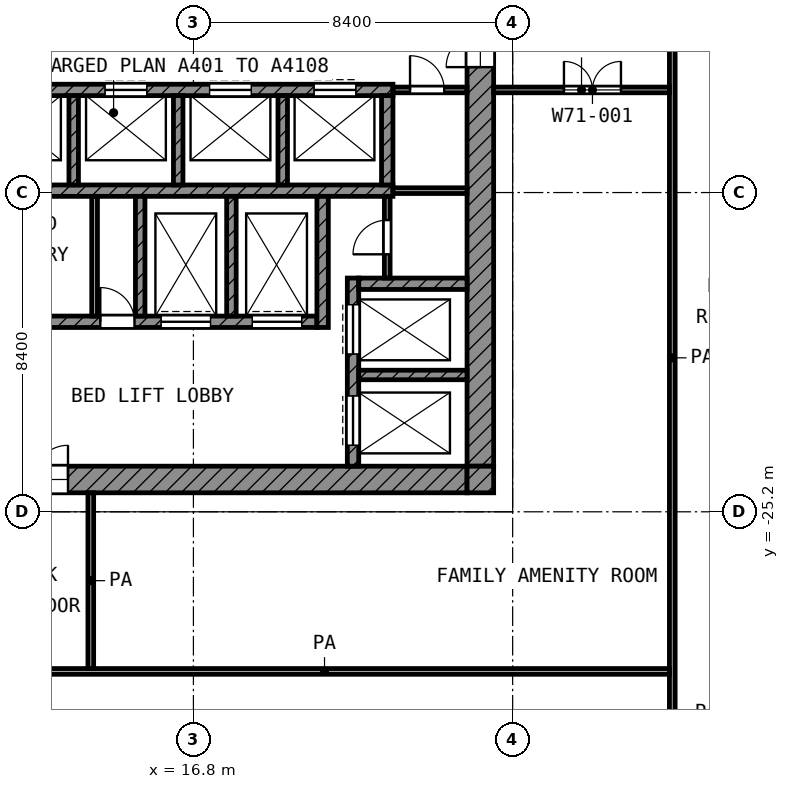
"""IFC4 building model, lengths in metres.
Left out: names, types, materials, properties, quantities, classifications, styles, units other than length and angle.
Written with IfcOpenShell. Run it as: python <this file> out.ifc"""

import sys

from ifc_helpers import new_model, si_unit, direction, frame, frame_2d, origin, place, context, subcontext, project, spatial, rectangle, extrude, element, fill, save


model = new_model("IFC4")
c1 = context("Model", 3, precision=1e-05, world=origin(), true_north=direction((0.0, 1.0)))
c2 = subcontext(c1, "Body", "Model", "MODEL_VIEW")
j1 = project(units=[si_unit("LENGTHUNIT", "METRE"), si_unit("PLANEANGLEUNIT", "RADIAN")], contexts=[c1])
p1 = place(None, origin())
s1 = spatial("IfcSite", under=j1, at=p1, CompositionType="ELEMENT")
p2 = place(p1, origin())
s2 = spatial("IfcBuilding", under=s1, at=p2, CompositionType="ELEMENT")
p3 = place(p2, frame((0.0, 0.0, 307.0)))
s3 = spatial("IfcBuildingStorey", under=s2, at=p3, CompositionType="ELEMENT", Elevation=307.0)
p4 = place(p3, frame((24.35, -24.0, 0.0), z_axis=(0.0, 0.0, 1.0), x_axis=(0.0, 1.0, 0.0)))
e1 = element("IfcWall", 1, at=p4, inside=s3, PredefinedType="SHEAR", context=c2, shape_type="SweptSolid", body=[
    extrude(rectangle(XDim=18.6, YDim=0.7, at=frame_2d((9.3, 0.0))), origin(), (0.0, 0.0, 1.0), 3.6),
])
p5 = place(p4, frame((10.5, 0.0, 0.0)))
e2 = element("IfcOpeningElement", 2, at=p5, cuts=e1, PredefinedType="OPENING", context=c2, shape_type="SweptSolid", body=[
    extrude(rectangle(XDim=1.8, YDim=2.1, at=frame_2d((0.9, 1.05))), frame((0.0, 0.36, 0.0), z_axis=(0.0, -1.0, 0.0), x_axis=(1.0, 0.0, 0.0)), (0.0, 0.0, 1.0), 0.72),
])
p6 = place(p3, frame((5.4, -24.35, 0.0), z_axis=(0.0, 0.0, 1.0), x_axis=(1.0, 0.0, 0.0)))
e3 = element("IfcWall", 3, at=p6, inside=s3, PredefinedType="SHEAR", context=c2, shape_type="SweptSolid", body=[
    extrude(rectangle(XDim=18.6, YDim=0.7, at=frame_2d((9.3, 0.0))), origin(), (0.0, 0.0, 1.0), 3.6),
])
p7 = place(p6, frame((6.3, 0.0, 0.0)))
e4 = element("IfcOpeningElement", 4, at=p7, cuts=e3, PredefinedType="OPENING", context=c2, shape_type="SweptSolid", body=[
    extrude(rectangle(XDim=1.8, YDim=2.1, at=frame_2d((0.9, 1.05))), frame((0.0, 0.36, 0.0), z_axis=(0.0, -1.0, 0.0), x_axis=(1.0, 0.0, 0.0)), (0.0, 0.0, 1.0), 0.72),
])
p8 = place(p3, frame((24.35, -24.7, 0.0), z_axis=(0.0, 0.0, 1.0), x_axis=(0.0, 1.0, 0.0)))
e5 = element("IfcWall", 5, at=p8, inside=s3, PredefinedType="SHEAR", context=c2, shape_type="SweptSolid", body=[
    extrude(rectangle(XDim=0.7, YDim=0.7, at=frame_2d((0.35, 0.0))), origin(), (0.0, 0.0, 1.0), 3.6),
])
p9 = place(p3, frame((5.4, -14.1, 0.0), z_axis=(0.0, 0.0, 1.0), x_axis=(1.0, 0.0, 0.0)))
e6 = element("IfcWall", 6, at=p9, inside=s3, PredefinedType="SHEAR", context=c2, shape_type="SweptSolid", body=[
    extrude(rectangle(XDim=16.65, YDim=0.3, at=frame_2d((8.325, 0.0))), origin(), (0.0, 0.0, 1.0), 3.6),
])
p10 = place(p9, frame((6.325, 0.0, 0.0)))
e7 = element("IfcOpeningElement", 7, at=p10, cuts=e6, PredefinedType="OPENING", context=c2, shape_type="SweptSolid", body=[
    extrude(rectangle(XDim=1.1, YDim=2.1, at=frame_2d((0.55, 1.05))), frame((0.0, 0.16, 0.0), z_axis=(0.0, -1.0, 0.0), x_axis=(1.0, 0.0, 0.0)), (0.0, 0.0, 1.0), 0.32),
])
p11 = place(p9, frame((9.075, 0.0, 0.0)))
e8 = element("IfcOpeningElement", 8, at=p11, cuts=e6, PredefinedType="OPENING", context=c2, shape_type="SweptSolid", body=[
    extrude(rectangle(XDim=1.1, YDim=2.1, at=frame_2d((0.55, 1.05))), frame((0.0, 0.16, 0.0), z_axis=(0.0, -1.0, 0.0), x_axis=(1.0, 0.0, 0.0)), (0.0, 0.0, 1.0), 0.32),
])
p12 = place(p9, frame((11.825, 0.0, 0.0)))
e9 = element("IfcOpeningElement", 9, at=p12, cuts=e6, PredefinedType="OPENING", context=c2, shape_type="SweptSolid", body=[
    extrude(rectangle(XDim=1.1, YDim=2.1, at=frame_2d((0.55, 1.05))), frame((0.0, 0.16, 0.0), z_axis=(0.0, -1.0, 0.0), x_axis=(1.0, 0.0, 0.0)), (0.0, 0.0, 1.0), 0.32),
])
p13 = place(p9, frame((14.575, 0.0, 0.0)))
e10 = element("IfcOpeningElement", 10, at=p13, cuts=e6, PredefinedType="OPENING", context=c2, shape_type="SweptSolid", body=[
    extrude(rectangle(XDim=1.1, YDim=2.1, at=frame_2d((0.55, 1.05))), frame((0.0, 0.16, 0.0), z_axis=(0.0, -1.0, 0.0), x_axis=(1.0, 0.0, 0.0)), (0.0, 0.0, 1.0), 0.32),
])
p14 = place(p9, frame((2.3, 0.0, 0.0)))
e11 = element("IfcOpeningElement", 11, at=p14, cuts=e6, PredefinedType="OPENING", context=c2, shape_type="SweptSolid", body=[
    extrude(rectangle(XDim=0.9, YDim=2.1, at=frame_2d((0.45, 1.05))), frame((0.0, 0.16, 0.0), z_axis=(0.0, -1.0, 0.0), x_axis=(1.0, 0.0, 0.0)), (0.0, 0.0, 1.0), 0.32),
])
p15 = place(p3, frame((5.4, -16.75, 0.0), z_axis=(0.0, 0.0, 1.0), x_axis=(1.0, 0.0, 0.0)))
e12 = element("IfcWall", 12, at=p15, inside=s3, PredefinedType="SHEAR", context=c2, shape_type="SweptSolid", body=[
    extrude(rectangle(XDim=16.65, YDim=0.3, at=frame_2d((8.325, 0.0))), origin(), (0.0, 0.0, 1.0), 3.6),
])
p16 = place(p3, frame((5.4, -20.2, 0.0), z_axis=(0.0, 0.0, 1.0), x_axis=(1.0, 0.0, 0.0)))
e13 = element("IfcWall", 13, at=p16, inside=s3, PredefinedType="SHEAR", context=c2, shape_type="SweptSolid", body=[
    extrude(rectangle(XDim=14.65, YDim=0.3, at=frame_2d((7.325, 0.0))), origin(), (0.0, 0.0, 1.0), 3.6),
])
p17 = place(p16, frame((10.55, 0.0, 0.0)))
e14 = element("IfcOpeningElement", 14, at=p17, cuts=e13, PredefinedType="OPENING", context=c2, shape_type="SweptSolid", body=[
    extrude(rectangle(XDim=1.3, YDim=2.1, at=frame_2d((0.65, 1.05))), frame((0.0, 0.16, 0.0), z_axis=(0.0, -1.0, 0.0), x_axis=(1.0, 0.0, 0.0)), (0.0, 0.0, 1.0), 0.32),
])
p18 = place(p16, frame((12.95, 0.0, 0.0)))
e15 = element("IfcOpeningElement", 15, at=p18, cuts=e13, PredefinedType="OPENING", context=c2, shape_type="SweptSolid", body=[
    extrude(rectangle(XDim=1.3, YDim=2.1, at=frame_2d((0.65, 1.05))), frame((0.0, 0.16, 0.0), z_axis=(0.0, -1.0, 0.0), x_axis=(1.0, 0.0, 0.0)), (0.0, 0.0, 1.0), 0.32),
])
p19 = place(p16, frame((0.55, 0.0, 0.0)))
e16 = element("IfcOpeningElement", 16, at=p19, cuts=e13, PredefinedType="OPENING", context=c2, shape_type="SweptSolid", body=[
    extrude(rectangle(XDim=1.3, YDim=2.1, at=frame_2d((0.65, 1.05))), frame((0.0, 0.16, 0.0), z_axis=(0.0, -1.0, 0.0), x_axis=(1.0, 0.0, 0.0)), (0.0, 0.0, 1.0), 0.32),
])
p20 = place(p16, frame((2.95, 0.0, 0.0)))
e17 = element("IfcOpeningElement", 17, at=p20, cuts=e13, PredefinedType="OPENING", context=c2, shape_type="SweptSolid", body=[
    extrude(rectangle(XDim=1.3, YDim=2.1, at=frame_2d((0.65, 1.05))), frame((0.0, 0.16, 0.0), z_axis=(0.0, -1.0, 0.0), x_axis=(1.0, 0.0, 0.0)), (0.0, 0.0, 1.0), 0.32),
])
p21 = place(p16, frame((6.55, 0.0, 0.0)))
e18 = element("IfcOpeningElement", 18, at=p21, cuts=e13, PredefinedType="OPENING", context=c2, shape_type="SweptSolid", body=[
    extrude(rectangle(XDim=0.9, YDim=2.1, at=frame_2d((0.45, 1.05))), frame((0.0, 0.16, 0.0), z_axis=(0.0, -1.0, 0.0), x_axis=(1.0, 0.0, 0.0)), (0.0, 0.0, 1.0), 0.32),
])
p22 = place(p16, frame((8.95, 0.0, 0.0)))
e19 = element("IfcOpeningElement", 19, at=p22, cuts=e13, PredefinedType="OPENING", context=c2, shape_type="SweptSolid", body=[
    extrude(rectangle(XDim=0.9, YDim=2.1, at=frame_2d((0.45, 1.05))), frame((0.0, 0.16, 0.0), z_axis=(0.0, -1.0, 0.0), x_axis=(1.0, 0.0, 0.0)), (0.0, 0.0, 1.0), 0.32),
])
p23 = place(p3, frame((20.2, -20.35, 0.0), z_axis=(0.0, 0.0, 1.0), x_axis=(0.0, 1.0, 0.0)))
e20 = element("IfcWall", 20, at=p23, inside=s3, PredefinedType="SHEAR", context=c2, shape_type="SweptSolid", body=[
    extrude(rectangle(XDim=3.45, YDim=0.3, at=frame_2d((1.725, 0.0))), origin(), (0.0, 0.0, 1.0), 3.6),
])
p24 = place(p3, frame((21.9, -16.6, 0.0), z_axis=(0.0, 0.0, 1.0), x_axis=(0.0, 1.0, 0.0)))
e21 = element("IfcWall", 21, at=p24, inside=s3, PredefinedType="SHEAR", context=c2, shape_type="SweptSolid", body=[
    extrude(rectangle(XDim=2.35, YDim=0.3, at=frame_2d((1.175, 0.0))), origin(), (0.0, 0.0, 1.0), 3.6),
])
p25 = place(p3, frame((21.15, -19.2, 0.0), z_axis=(0.0, 0.0, 1.0), x_axis=(1.0, 0.0, 0.0)))
e22 = element("IfcWall", 22, at=p25, inside=s3, PredefinedType="SHEAR", context=c2, shape_type="SweptSolid", body=[
    extrude(rectangle(XDim=2.85, YDim=0.3, at=frame_2d((1.425, 0.0))), origin(), (0.0, 0.0, 1.0), 3.6),
])
p26 = place(p3, frame((21.0, -24.0, 0.0), z_axis=(0.0, 0.0, 1.0), x_axis=(0.0, 1.0, 0.0)))
e23 = element("IfcWall", 23, at=p26, inside=s3, PredefinedType="SHEAR", context=c2, shape_type="SweptSolid", body=[
    extrude(rectangle(XDim=4.95, YDim=0.3, at=frame_2d((2.475, 0.0))), origin(), (0.0, 0.0, 1.0), 3.6),
])
p27 = place(p26, frame((2.95, 0.0, 0.0)))
e24 = element("IfcOpeningElement", 24, at=p27, cuts=e23, PredefinedType="OPENING", context=c2, shape_type="SweptSolid", body=[
    extrude(rectangle(XDim=1.3, YDim=2.1, at=frame_2d((0.65, 1.05))), frame((0.0, 0.16, 0.0), z_axis=(0.0, -1.0, 0.0), x_axis=(1.0, 0.0, 0.0)), (0.0, 0.0, 1.0), 0.32),
])
p28 = place(p26, frame((0.55, 0.0, 0.0)))
e25 = element("IfcOpeningElement", 25, at=p28, cuts=e23, PredefinedType="OPENING", context=c2, shape_type="SweptSolid", body=[
    extrude(rectangle(XDim=1.3, YDim=2.1, at=frame_2d((0.65, 1.05))), frame((0.0, 0.16, 0.0), z_axis=(0.0, -1.0, 0.0), x_axis=(1.0, 0.0, 0.0)), (0.0, 0.0, 1.0), 0.32),
])
p29 = place(p3, frame((21.15, -21.6, 0.0), z_axis=(0.0, 0.0, 1.0), x_axis=(1.0, 0.0, 0.0)))
e26 = element("IfcWall", 26, at=p29, inside=s3, PredefinedType="SHEAR", context=c2, shape_type="SweptSolid", body=[
    extrude(rectangle(XDim=2.85, YDim=0.25, at=frame_2d((1.425, 0.0))), origin(), (0.0, 0.0, 1.0), 3.6),
])
for number, where, z_axis, x_axis in (
    (27, (15.4, -20.05, 0.0), (0.0, 0.0, 1.0), (0.0, 1.0, 0.0)),
    (28, (17.8, -20.05, 0.0), (0.0, 0.0, 1.0), (0.0, 1.0, 0.0)),
):
    element("IfcWall", number, at=place(p3, frame(where, z_axis=z_axis, x_axis=x_axis)), inside=s3, PredefinedType="SHEAR", context=c2, shape_type="SweptSolid", body=[
        extrude(rectangle(XDim=3.15, YDim=0.25, at=frame_2d((1.575, 0.0))), origin(), (0.0, 0.0, 1.0), 3.6),
    ])
for number, where, z_axis, x_axis in (
    (29, (13.65, -16.6, 0.0), (0.0, 0.0, 1.0), (0.0, 1.0, 0.0)),
    (30, (16.4, -16.6, 0.0), (0.0, 0.0, 1.0), (0.0, 1.0, 0.0)),
    (31, (19.15, -16.6, 0.0), (0.0, 0.0, 1.0), (0.0, 1.0, 0.0)),
):
    element("IfcWall", number, at=place(p3, frame(where, z_axis=z_axis, x_axis=x_axis)), inside=s3, PredefinedType="SHEAR", context=c2, shape_type="SweptSolid", body=[
        extrude(rectangle(XDim=2.35, YDim=0.25, at=frame_2d((1.175, 0.0))), origin(), (0.0, 0.0, 1.0), 3.6),
    ])
p30 = place(p3, frame((21.9, -19.05, 0.0), z_axis=(0.0, 0.0, 1.0), x_axis=(0.0, 1.0, 0.0)))
e32 = element("IfcWall", 32, at=p30, inside=s3, PredefinedType="PARTITIONING", context=c2, shape_type="SweptSolid", body=[
    extrude(rectangle(XDim=2.15, YDim=0.15, at=frame_2d((1.075, 0.0))), origin(), (0.0, 0.0, 1.0), 3.6),
])
p31 = place(p30, frame((0.625, 0.0, 0.0)))
e33 = element("IfcOpeningElement", 33, at=p31, cuts=e32, PredefinedType="OPENING", context=c2, shape_type="SweptSolid", body=[
    extrude(rectangle(XDim=0.9, YDim=2.1, at=frame_2d((0.45, 1.05))), frame((0.0, 0.085, 0.0), z_axis=(0.0, -1.0, 0.0), x_axis=(1.0, 0.0, 0.0)), (0.0, 0.0, 1.0), 0.17),
])
p32 = place(p3, frame((22.05, -16.75, 0.0), z_axis=(0.0, 0.0, 1.0), x_axis=(1.0, 0.0, 0.0)))
e34 = element("IfcWall", 34, at=p32, inside=s3, PredefinedType="PARTITIONING", context=c2, shape_type="SweptSolid", body=[
    extrude(rectangle(XDim=1.95, YDim=0.15, at=frame_2d((0.975, 0.0))), origin(), (0.0, 0.0, 1.0), 3.6),
])
p33 = place(p3, frame((22.05, -14.1, 0.0), z_axis=(0.0, 0.0, 1.0), x_axis=(1.0, 0.0, 0.0)))
e35 = element("IfcWall", 35, at=p33, inside=s3, PredefinedType="PARTITIONING", context=c2, shape_type="SweptSolid", body=[
    extrude(rectangle(XDim=1.95, YDim=0.15, at=frame_2d((0.975, 0.0))), origin(), (0.0, 0.0, 1.0), 3.6),
])
p34 = place(p33, frame((0.45, 0.0, 0.0)))
e36 = element("IfcOpeningElement", 36, at=p34, cuts=e35, PredefinedType="OPENING", context=c2, shape_type="SweptSolid", body=[
    extrude(rectangle(XDim=0.9, YDim=2.1, at=frame_2d((0.45, 1.05))), frame((0.0, 0.085, 0.0), z_axis=(0.0, -1.0, 0.0), x_axis=(1.0, 0.0, 0.0)), (0.0, 0.0, 1.0), 0.17),
])
p35 = place(p3, frame((14.2, -20.05, 0.0), z_axis=(0.0, 0.0, 1.0), x_axis=(0.0, 1.0, 0.0)))
e37 = element("IfcWall", 37, at=p35, inside=s3, PredefinedType="PARTITIONING", context=c2, shape_type="SweptSolid", body=[
    extrude(rectangle(XDim=3.15, YDim=0.15, at=frame_2d((1.575, 0.0))), origin(), (0.0, 0.0, 1.0), 3.6),
])
p36 = place(p3, frame((11.175, -29.4, 0.0), z_axis=(0.0, 0.0, 1.0), x_axis=(1.0, 0.0, 0.0)))
e38 = element("IfcWall", 38, at=p36, inside=s3, PredefinedType="PARTITIONING", context=c2, shape_type="SweptSolid", body=[
    extrude(rectangle(XDim=18.15, YDim=0.15, at=frame_2d((9.075, 0.0))), origin(), (0.0, 0.0, 1.0), 3.6),
])
p37 = place(p3, frame((24.7, -14.1, 0.0), z_axis=(0.0, 0.0, 1.0), x_axis=(1.0, 0.0, 0.0)))
e39 = element("IfcWall", 39, at=p37, inside=s3, PredefinedType="PARTITIONING", context=c2, shape_type="SweptSolid", body=[
    extrude(rectangle(XDim=4.625, YDim=0.15, at=frame_2d((2.312, 0.0))), origin(), (0.0, 0.0, 1.0), 3.6),
])
p38 = place(p37, frame((1.85, 0.0, 0.0)))
e40 = element("IfcOpeningElement", 40, at=p38, cuts=e39, PredefinedType="OPENING", context=c2, shape_type="SweptSolid", body=[
    extrude(rectangle(XDim=1.5, YDim=2.1, at=frame_2d((0.75, 1.05))), frame((0.0, 0.085, 0.0), z_axis=(0.0, -1.0, 0.0), x_axis=(1.0, 0.0, 0.0)), (0.0, 0.0, 1.0), 0.17),
])
p39 = place(p3, frame((14.1, -29.325, 0.0), z_axis=(0.0, 0.0, 1.0), x_axis=(0.0, 1.0, 0.0)))
e41 = element("IfcWall", 41, at=p39, inside=s3, PredefinedType="PARTITIONING", context=c2, shape_type="SweptSolid", body=[
    extrude(rectangle(XDim=4.625, YDim=0.15, at=frame_2d((2.312, 0.0))), origin(), (0.0, 0.0, 1.0), 3.6),
])
p40 = place(p3, frame((29.4, -31.198, 0.0), z_axis=(0.0, 0.0, 1.0), x_axis=(0.0, 1.0, 0.0)))
e42 = element("IfcWall", 42, at=p40, inside=s3, PredefinedType="PARTITIONING", context=c2, shape_type="SweptSolid", body=[
    extrude(rectangle(XDim=20.098, YDim=0.15, at=frame_2d((10.049, 0.0))), origin(), (0.0, 0.0, 1.0), 3.6),
])
p41 = place(p11, origin())
e43 = element("IfcDoor", 43, at=p41, inside=s3, OperationType="DOUBLE_DOOR_SLIDING", PredefinedType="DOOR", context=c2, shape_type="SweptSolid", body=[
    extrude(rectangle(XDim=1.1, YDim=2.1, at=frame_2d((0.55, 1.05))), frame((0.0, 0.025, 0.0), z_axis=(0.0, -1.0, 0.0), x_axis=(1.0, 0.0, 0.0)), (0.0, 0.0, 1.0), 0.05),
])
fill(e8, e43)
p42 = place(p12, origin())
e44 = element("IfcDoor", 44, at=p42, inside=s3, OperationType="DOUBLE_DOOR_SLIDING", PredefinedType="DOOR", context=c2, shape_type="SweptSolid", body=[
    extrude(rectangle(XDim=1.1, YDim=2.1, at=frame_2d((0.55, 1.05))), frame((0.0, 0.025, 0.0), z_axis=(0.0, -1.0, 0.0), x_axis=(1.0, 0.0, 0.0)), (0.0, 0.0, 1.0), 0.05),
])
fill(e9, e44)
p43 = place(p13, origin())
e45 = element("IfcDoor", 45, at=p43, inside=s3, OperationType="DOUBLE_DOOR_SLIDING", PredefinedType="DOOR", context=c2, shape_type="SweptSolid", body=[
    extrude(rectangle(XDim=1.1, YDim=2.1, at=frame_2d((0.55, 1.05))), frame((0.0, 0.025, 0.0), z_axis=(0.0, -1.0, 0.0), x_axis=(1.0, 0.0, 0.0)), (0.0, 0.0, 1.0), 0.05),
])
fill(e10, e45)
p44 = place(p27, origin())
e46 = element("IfcDoor", 46, at=p44, inside=s3, OperationType="DOUBLE_DOOR_SLIDING", PredefinedType="DOOR", context=c2, shape_type="SweptSolid", body=[
    extrude(rectangle(XDim=1.3, YDim=2.1, at=frame_2d((0.65, 1.05))), frame((0.0, 0.025, 0.0), z_axis=(0.0, -1.0, 0.0), x_axis=(1.0, 0.0, 0.0)), (0.0, 0.0, 1.0), 0.05),
])
fill(e24, e46)
p45 = place(p28, origin())
e47 = element("IfcDoor", 47, at=p45, inside=s3, OperationType="DOUBLE_DOOR_SLIDING", PredefinedType="DOOR", context=c2, shape_type="SweptSolid", body=[
    extrude(rectangle(XDim=1.3, YDim=2.1, at=frame_2d((0.65, 1.05))), frame((0.0, 0.025, 0.0), z_axis=(0.0, -1.0, 0.0), x_axis=(1.0, 0.0, 0.0)), (0.0, 0.0, 1.0), 0.05),
])
fill(e25, e47)
p46 = place(p17, origin())
e48 = element("IfcDoor", 48, at=p46, inside=s3, OperationType="DOUBLE_DOOR_SLIDING", PredefinedType="DOOR", context=c2, shape_type="SweptSolid", body=[
    extrude(rectangle(XDim=1.3, YDim=2.1, at=frame_2d((0.65, 1.05))), frame((0.0, 0.025, 0.0), z_axis=(0.0, -1.0, 0.0), x_axis=(1.0, 0.0, 0.0)), (0.0, 0.0, 1.0), 0.05),
])
fill(e14, e48)
p47 = place(p18, origin())
e49 = element("IfcDoor", 49, at=p47, inside=s3, OperationType="DOUBLE_DOOR_SLIDING", PredefinedType="DOOR", context=c2, shape_type="SweptSolid", body=[
    extrude(rectangle(XDim=1.3, YDim=2.1, at=frame_2d((0.65, 1.05))), frame((0.0, 0.025, 0.0), z_axis=(0.0, -1.0, 0.0), x_axis=(1.0, 0.0, 0.0)), (0.0, 0.0, 1.0), 0.05),
])
fill(e15, e49)
p48 = place(p5, origin())
e50 = element("IfcDoor", 50, at=p48, inside=s3, OperationType="DOUBLE_DOOR_SINGLE_SWING", PredefinedType="DOOR", context=c2, shape_type="SweptSolid", body=[
    extrude(rectangle(XDim=1.8, YDim=2.1, at=frame_2d((0.9, 1.05))), frame((0.0, 0.025, 0.0), z_axis=(0.0, -1.0, 0.0), x_axis=(1.0, 0.0, 0.0)), (0.0, 0.0, 1.0), 0.05),
])
fill(e2, e50)
p49 = place(p7, origin())
e51 = element("IfcDoor", 51, at=p49, inside=s3, OperationType="DOUBLE_DOOR_SINGLE_SWING", PredefinedType="DOOR", context=c2, shape_type="SweptSolid", body=[
    extrude(rectangle(XDim=1.8, YDim=2.1, at=frame_2d((0.9, 1.05))), frame((0.0, 0.025, 0.0), z_axis=(0.0, -1.0, 0.0), x_axis=(1.0, 0.0, 0.0)), (0.0, 0.0, 1.0), 0.05),
])
fill(e4, e51)
p50 = place(p34, origin())
e52 = element("IfcDoor", 52, at=p50, inside=s3, OperationType="SINGLE_SWING_LEFT", PredefinedType="DOOR", context=c2, shape_type="SweptSolid", body=[
    extrude(rectangle(XDim=0.9, YDim=2.1, at=frame_2d((0.45, 1.05))), frame((0.0, 0.025, 0.0), z_axis=(0.0, -1.0, 0.0), x_axis=(1.0, 0.0, 0.0)), (0.0, 0.0, 1.0), 0.05),
])
fill(e36, e52)
p51 = place(p31, origin())
e53 = element("IfcDoor", 53, at=p51, inside=s3, OperationType="SINGLE_SWING_LEFT", PredefinedType="DOOR", context=c2, shape_type="SweptSolid", body=[
    extrude(rectangle(XDim=0.9, YDim=2.1, at=frame_2d((0.45, 1.05))), frame((0.0, 0.025, 0.0), z_axis=(0.0, -1.0, 0.0), x_axis=(1.0, 0.0, 0.0)), (0.0, 0.0, 1.0), 0.05),
])
fill(e33, e53)
p52 = place(p22, origin())
e54 = element("IfcDoor", 54, at=p52, inside=s3, OperationType="SINGLE_SWING_LEFT", PredefinedType="DOOR", context=c2, shape_type="SweptSolid", body=[
    extrude(rectangle(XDim=0.9, YDim=2.1, at=frame_2d((0.45, 1.05))), frame((0.0, 0.025, 0.0), z_axis=(0.0, -1.0, 0.0), x_axis=(1.0, 0.0, 0.0)), (0.0, 0.0, 1.0), 0.05),
])
fill(e19, e54)
p53 = place(p38, origin())
e55 = element("IfcDoor", 55, at=p53, inside=s3, OperationType="DOUBLE_DOOR_SINGLE_SWING", PredefinedType="DOOR", context=c2, shape_type="SweptSolid", body=[
    extrude(rectangle(XDim=1.5, YDim=2.1, at=frame_2d((0.75, 1.05))), frame((0.0, 0.025, 0.0), z_axis=(0.0, -1.0, 0.0), x_axis=(1.0, 0.0, 0.0)), (0.0, 0.0, 1.0), 0.05),
])
fill(e40, e55)
save(model, sys.argv[1])
